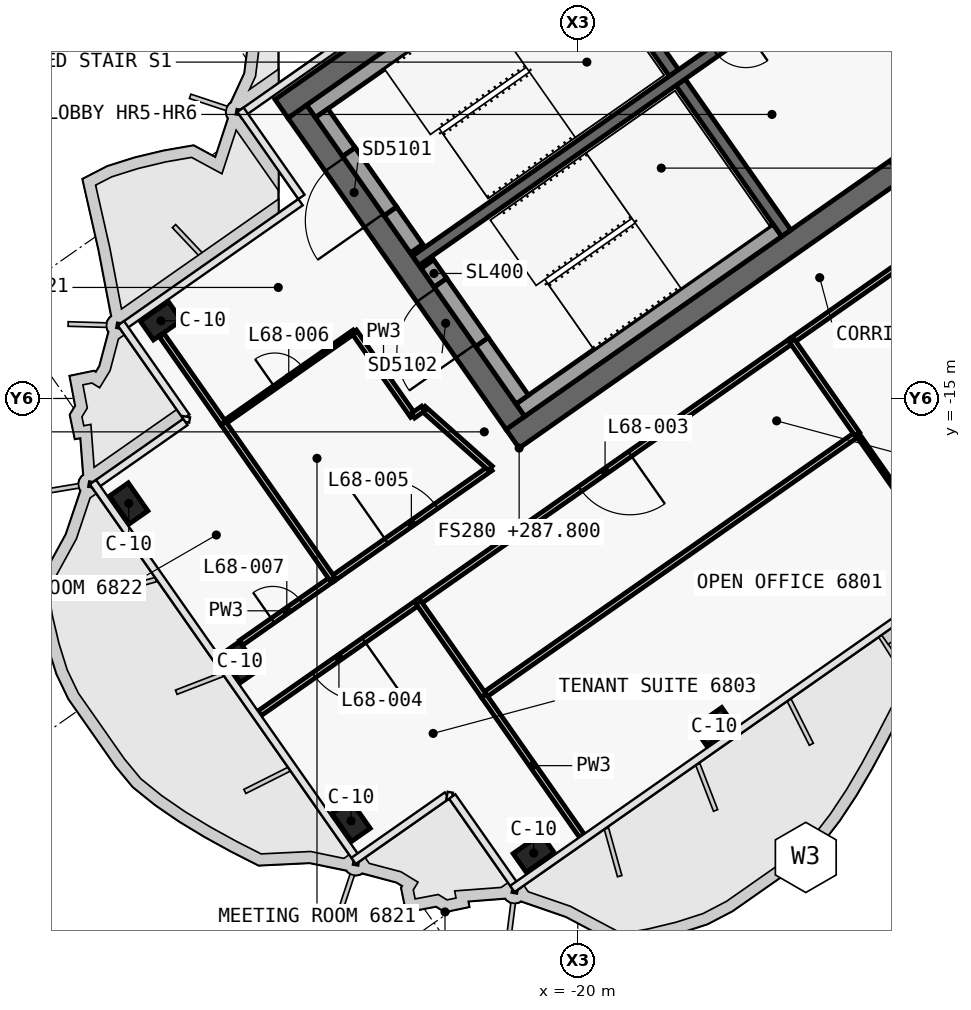
"""IFC4 building model, lengths in metres.
Left out: names, types, materials, properties, quantities, classifications, styles, units other than length and angle.
Written with IfcOpenShell. Run it as: python <this file> out.ifc"""

import sys

from ifc_helpers import new_model, si_unit, direction, frame, frame_2d, origin, origin_2d, place, context, subcontext, project, spatial, polyline, rectangle, outline, extrude, element, fill, save


model = new_model("IFC4")
c1 = context("Model", 3, precision=1e-05, world=origin(), true_north=direction((0.0, 1.0)))
c2 = subcontext(c1, "Body", "Model", "MODEL_VIEW")
j1 = project(units=[si_unit("LENGTHUNIT", "METRE"), si_unit("PLANEANGLEUNIT", "RADIAN")], contexts=[c1])
p1 = place(None, origin())
s1 = spatial("IfcSite", under=j1, at=p1, CompositionType="ELEMENT")
p2 = place(p1, origin())
s2 = spatial("IfcBuilding", under=s1, at=p2, CompositionType="ELEMENT")
p3 = place(p2, frame((0.0, 0.0, 287.8)))
s3 = spatial("IfcBuildingStorey", under=s2, at=p3, CompositionType="ELEMENT", Elevation=287.8)
p4 = place(p3, frame((-0.028, 12.066, 0.0), z_axis=(0.0, 0.0, 1.0), x_axis=(-0.819151382952, -0.573577380837, 0.0)))
e1 = element("IfcWall", 1, at=p4, inside=s3, PredefinedType="SHEAR", context=c2, shape_type="SweptSolid", body=[
    extrude(outline(polyline([(33.898, 0.3), (0.42, 0.3), (0.0, -0.3), (33.898, -0.3), (33.898, 0.3)])), origin(), (0.0, 0.0, 1.0), 3.9),
])
p5 = place(p3, frame((-0.028, -0.874, 0.0), z_axis=(0.0, 0.0, 1.0), x_axis=(-0.819150035022, -0.573579305871, 0.0)))
e2 = element("IfcWall", 2, at=p5, inside=s3, PredefinedType="SHEAR", context=c2, shape_type="SweptSolid", body=[
    extrude(outline(polyline([(26.476, 0.3), (0.42, 0.3), (0.0, -0.3), (26.476, -0.3), (26.476, 0.3)])), origin(), (0.0, 0.0, 1.0), 3.9),
])
p6 = place(p5, frame((2.976, 0.0, 0.0)))
e3 = element("IfcOpeningElement", 3, at=p6, cuts=e2, PredefinedType="OPENING", context=c2, shape_type="SweptSolid", body=[
    extrude(rectangle(XDim=2.4, YDim=2.1, at=frame_2d((1.2, 1.05))), frame((0.0, 0.31, 0.0), z_axis=(0.0, -1.0, 0.0), x_axis=(1.0, 0.0, 0.0)), (0.0, 0.0, 1.0), 0.62),
])
p7 = place(p5, frame((11.776, 0.0, 0.0)))
e4 = element("IfcOpeningElement", 4, at=p7, cuts=e2, PredefinedType="OPENING", context=c2, shape_type="SweptSolid", body=[
    extrude(rectangle(XDim=2.4, YDim=2.1, at=frame_2d((1.2, 1.05))), frame((0.0, 0.31, 0.0), z_axis=(0.0, -1.0, 0.0), x_axis=(1.0, 0.0, 0.0)), (0.0, 0.0, 1.0), 0.62),
])
p8 = place(p3, frame((-21.642, -15.642, 0.0), z_axis=(0.0, 0.0, 1.0), x_axis=(-0.573586866468, 0.819144740944, 0.0)))
e5 = element("IfcWall", 5, at=p8, inside=s3, PredefinedType="SHEAR", context=c2, shape_type="SweptSolid", body=[
    extrude(outline(polyline([(0.0, 0.3), (0.0, -0.3), (10.0, -0.3), (10.0, 0.3), (0.0, 0.3)])), origin(), (0.0, 0.0, 1.0), 3.9),
])
p9 = place(p8, frame((6.5, 0.0, 0.0)))
e6 = element("IfcOpeningElement", 6, at=p9, cuts=e5, PredefinedType="OPENING", context=c2, shape_type="SweptSolid", body=[
    extrude(rectangle(XDim=1.8, YDim=2.1, at=frame_2d((0.9, 1.05))), frame((0.0, 0.31, 0.0), z_axis=(0.0, -1.0, 0.0), x_axis=(1.0, 0.0, 0.0)), (0.0, 0.0, 1.0), 0.62),
])
p10 = place(p8, frame((2.3, 0.0, 0.0)))
e7 = element("IfcOpeningElement", 7, at=p10, cuts=e5, PredefinedType="OPENING", context=c2, shape_type="SweptSolid", body=[
    extrude(rectangle(XDim=1.8, YDim=2.1, at=frame_2d((0.9, 1.05))), frame((0.0, 0.31, 0.0), z_axis=(0.0, -1.0, 0.0), x_axis=(1.0, 0.0, 0.0)), (0.0, 0.0, 1.0), 0.62),
])
p11 = place(p3, frame((-14.515, -10.652, 0.0), z_axis=(0.0, 0.0, 1.0), x_axis=(-0.573560315113, 0.819163332265, 0.0)))
e8 = element("IfcWall", 8, at=p11, inside=s3, PredefinedType="SHEAR", context=c2, shape_type="SweptSolid", body=[
    extrude(outline(polyline([(4.85, 0.15), (0.0, 0.15), (0.0, -0.15), (4.85, -0.15), (4.85, 0.15)])), origin(), (0.0, 0.0, 1.0), 3.9),
])
p12 = place(p3, frame((-17.469, -6.433, 0.0), z_axis=(0.0, 0.0, 1.0), x_axis=(-0.573594092424, 0.81913968109, 0.0)))
e9 = element("IfcWall", 9, at=p12, inside=s3, PredefinedType="SHEAR", context=c2, shape_type="SweptSolid", body=[
    extrude(outline(polyline([(4.85, -0.15), (4.85, 0.15), (0.0, 0.15), (0.0, -0.15), (4.85, -0.15)])), origin(), (0.0, 0.0, 1.0), 3.9),
])
p13 = place(p3, frame((-2.638, 3.768, 0.0), z_axis=(0.0, 0.0, 1.0), x_axis=(-0.819155014212, -0.573572194837, 0.0)))
e10 = element("IfcWall", 10, at=p13, inside=s3, PredefinedType="SHEAR", context=c2, shape_type="SweptSolid", body=[
    extrude(outline(polyline([(26.4, 0.15), (0.0, 0.15), (0.0, -0.15), (26.4, -0.15), (26.4, 0.15)])), origin(), (0.0, 0.0, 1.0), 3.9),
])
p14 = place(p13, frame((1.169, 0.0, 0.0)))
e11 = element("IfcOpeningElement", 11, at=p14, cuts=e10, PredefinedType="OPENING", context=c2, shape_type="SweptSolid", body=[
    extrude(rectangle(XDim=1.1, YDim=2.1, at=frame_2d((0.55, 1.05))), frame((0.0, 0.16, 0.0), z_axis=(0.0, -1.0, 0.0), x_axis=(1.0, 0.0, 0.0)), (0.0, 0.0, 1.0), 0.32),
])
p15 = place(p13, frame((3.206, 0.0, 0.0)))
e12 = element("IfcOpeningElement", 12, at=p15, cuts=e10, PredefinedType="OPENING", context=c2, shape_type="SweptSolid", body=[
    extrude(rectangle(XDim=1.1, YDim=2.1, at=frame_2d((0.55, 1.05))), frame((0.0, 0.16, 0.0), z_axis=(0.0, -1.0, 0.0), x_axis=(1.0, 0.0, 0.0)), (0.0, 0.0, 1.0), 0.32),
])
p16 = place(p13, frame((5.244, 0.0, 0.0)))
e13 = element("IfcOpeningElement", 13, at=p16, cuts=e10, PredefinedType="OPENING", context=c2, shape_type="SweptSolid", body=[
    extrude(rectangle(XDim=1.1, YDim=2.1, at=frame_2d((0.55, 1.05))), frame((0.0, 0.16, 0.0), z_axis=(0.0, -1.0, 0.0), x_axis=(1.0, 0.0, 0.0)), (0.0, 0.0, 1.0), 0.32),
])
p17 = place(p13, frame((7.281, 0.0, 0.0)))
e14 = element("IfcOpeningElement", 14, at=p17, cuts=e10, PredefinedType="OPENING", context=c2, shape_type="SweptSolid", body=[
    extrude(rectangle(XDim=1.1, YDim=2.1, at=frame_2d((0.55, 1.05))), frame((0.0, 0.16, 0.0), z_axis=(0.0, -1.0, 0.0), x_axis=(1.0, 0.0, 0.0)), (0.0, 0.0, 1.0), 0.32),
])
p18 = place(p13, frame((9.688, 0.0, 0.0)))
e15 = element("IfcOpeningElement", 15, at=p18, cuts=e10, PredefinedType="OPENING", context=c2, shape_type="SweptSolid", body=[
    extrude(rectangle(XDim=1.1, YDim=2.1, at=frame_2d((0.55, 1.05))), frame((0.0, 0.16, 0.0), z_axis=(0.0, -1.0, 0.0), x_axis=(1.0, 0.0, 0.0)), (0.0, 0.0, 1.0), 0.32),
])
p19 = place(p13, frame((11.863, 0.0, 0.0)))
e16 = element("IfcOpeningElement", 16, at=p19, cuts=e10, PredefinedType="OPENING", context=c2, shape_type="SweptSolid", body=[
    extrude(rectangle(XDim=1.1, YDim=2.1, at=frame_2d((0.55, 1.05))), frame((0.0, 0.16, 0.0), z_axis=(0.0, -1.0, 0.0), x_axis=(1.0, 0.0, 0.0)), (0.0, 0.0, 1.0), 0.32),
])
p20 = place(p13, frame((13.722, 0.0, 0.0)))
e17 = element("IfcOpeningElement", 17, at=p20, cuts=e10, PredefinedType="OPENING", context=c2, shape_type="SweptSolid", body=[
    extrude(rectangle(XDim=1.0, YDim=2.1, at=frame_2d((0.5, 1.05))), frame((0.0, 0.16, 0.0), z_axis=(0.0, -1.0, 0.0), x_axis=(1.0, 0.0, 0.0)), (0.0, 0.0, 1.0), 0.32),
])
p21 = place(p13, frame((15.798, 0.0, 0.0)))
e18 = element("IfcOpeningElement", 18, at=p21, cuts=e10, PredefinedType="OPENING", context=c2, shape_type="SweptSolid", body=[
    extrude(rectangle(XDim=1.0, YDim=2.1, at=frame_2d((0.5, 1.05))), frame((0.0, 0.16, 0.0), z_axis=(0.0, -1.0, 0.0), x_axis=(1.0, 0.0, 0.0)), (0.0, 0.0, 1.0), 0.32),
])
for number, where, z_axis, x_axis in (
    (19, (-16.41, -23.637, 0.0), (0.0, 0.0, 1.0), (-0.819, -0.574, 0.0)),
    (20, (-21.161, -26.964, 0.0), (0.0, 0.0, 1.0), (-0.819, -0.574, 0.0)),
    (21, (-30.969, -12.956, 0.0), (0.0, 0.0, 1.0), (-0.819, -0.574, 0.0)),
    (22, (-25.966, -26.117, 0.0), (0.0, 0.0, 1.0), (-0.574, 0.819, 0.0)),
    (23, (-28.891, -21.939, 0.0), (0.0, 0.0, 1.0), (-0.574, 0.819, 0.0)),
    (24, (-31.816, -17.761, 0.0), (0.0, 0.0, 1.0), (-0.574, 0.819, 0.0)),
):
    element("IfcColumn", number, at=place(p3, frame(where, z_axis=z_axis, x_axis=x_axis)), inside=s3, PredefinedType="COLUMN", context=c2, shape_type="SweptSolid", body=[
        extrude(rectangle(XDim=0.9, YDim=0.6, at=origin_2d()), origin(), (0.0, 0.0, 1.0), 3.9),
    ])
p22 = place(p3, frame((-20.259, -2.71, 0.0), z_axis=(0.0, 0.0, 1.0), x_axis=(-0.81914849389, -0.573581506813, 0.0)))
e25 = element("IfcWall", 25, at=p22, inside=s3, PredefinedType="SOLIDWALL", context=c2, shape_type="SweptSolid", body=[
    extrude(rectangle(XDim=8.25, YDim=0.4, at=frame_2d((4.125, 0.0))), origin(), (0.0, 0.0, 1.0), 3.62),
])
p23 = place(p3, frame((-24.244, -11.055, 0.0), z_axis=(0.0, 0.0, 1.0), x_axis=(-0.573571582932, 0.819155442668, 0.0)))
e26 = element("IfcWall", 26, at=p23, inside=s3, PredefinedType="SOLIDWALL", context=c2, shape_type="SweptSolid", body=[
    extrude(rectangle(XDim=1.2, YDim=0.4, at=frame_2d((0.6, 0.0))), origin(), (0.0, 0.0, 1.0), 3.62),
])
p24 = place(p3, frame((-26.022, -8.515, 0.0), z_axis=(0.0, 0.0, 1.0), x_axis=(-0.573619628835, 0.819121798889, 0.0)))
e27 = element("IfcWall", 27, at=p24, inside=s3, PredefinedType="SOLIDWALL", context=c2, shape_type="SweptSolid", body=[
    extrude(rectangle(XDim=1.25, YDim=0.4, at=frame_2d((0.625, 0.0))), origin(), (0.0, 0.0, 1.0), 3.62),
])
p25 = place(p3, frame((-24.932, -10.072, 2.15), z_axis=(0.0, 0.0, 1.0), x_axis=(-0.573591692345, 0.819141361715, 0.0)))
e28 = element("IfcWall", 28, at=p25, inside=s3, PredefinedType="SOLIDWALL", context=c2, shape_type="SweptSolid", body=[
    extrude(rectangle(XDim=1.9, YDim=0.4, at=frame_2d((0.95, 0.0))), origin(), (0.0, 0.0, 1.0), 1.47),
])
p26 = place(p3, frame((-14.753, -10.574, 0.0), z_axis=(0.0, 0.0, 1.0), x_axis=(-0.819158229677, -0.573567602601, 0.0)))
e29 = element("IfcWall", 29, at=p26, inside=s3, PredefinedType="SOLIDWALL", context=c2, shape_type="SweptSolid", body=[
    extrude(rectangle(XDim=8.25, YDim=0.4, at=frame_2d((4.125, 0.0))), origin(), (0.0, 0.0, 1.0), 3.62),
])
p27 = place(p3, frame((-21.462, -15.028, 0.0), z_axis=(0.0, 0.0, 1.0), x_axis=(-0.573559770908, 0.819163713305, 0.0)))
e30 = element("IfcWall", 30, at=p27, inside=s3, PredefinedType="SOLIDWALL", context=c2, shape_type="SweptSolid", body=[
    extrude(rectangle(XDim=1.85, YDim=0.4, at=frame_2d((0.925, 0.0))), origin(), (0.0, 0.0, 1.0), 3.62),
])
p28 = place(p3, frame((-23.613, -11.956, 0.0), z_axis=(0.0, 0.0, 1.0), x_axis=(-0.573435029941, 0.819251039936, 0.0)))
e31 = element("IfcWall", 31, at=p28, inside=s3, PredefinedType="SOLIDWALL", context=c2, shape_type="SweptSolid", body=[
    extrude(rectangle(XDim=0.6, YDim=0.4, at=frame_2d((0.3, 0.0))), origin(), (0.0, 0.0, 1.0), 3.62),
])
p29 = place(p3, frame((-22.523, -13.512, 2.15), z_axis=(0.0, 0.0, 1.0), x_axis=(-0.573591692345, 0.819141361715, 0.0)))
e32 = element("IfcWall", 32, at=p29, inside=s3, PredefinedType="SOLIDWALL", context=c2, shape_type="SweptSolid", body=[
    extrude(rectangle(XDim=1.9, YDim=0.4, at=frame_2d((0.95, 0.0))), origin(), (0.0, 0.0, 1.0), 1.47),
])
p30 = place(p3, frame((-26.459, -19.749, 0.0), z_axis=(0.0, 0.0, 1.0), x_axis=(0.819141574295, 0.573591388761, 0.0)))
e33 = element("IfcWall", 33, at=p30, inside=s3, PredefinedType="PARTITIONING", context=c2, shape_type="SweptSolid", body=[
    extrude(rectangle(XDim=5.079, YDim=0.15, at=frame_2d((2.539, 0.0))), origin(), (0.0, 0.0, 1.0), 3.05),
])
p31 = place(p30, frame((1.74, 0.0, 0.0)))
e34 = element("IfcOpeningElement", 34, at=p31, cuts=e33, PredefinedType="OPENING", context=c2, shape_type="SweptSolid", body=[
    extrude(rectangle(XDim=1.6, YDim=2.1, at=frame_2d((0.8, 1.05))), frame((0.0, 0.085, 0.0), z_axis=(0.0, -1.0, 0.0), x_axis=(1.0, 0.0, 0.0)), (0.0, 0.0, 1.0), 0.17),
])
p32 = place(p3, frame((-28.858, -21.428, 0.0), z_axis=(0.0, 0.0, 1.0), x_axis=(0.819149757547, 0.573579702143, 0.0)))
e35 = element("IfcWall", 35, at=p32, inside=s3, PredefinedType="PARTITIONING", context=c2, shape_type="SweptSolid", body=[
    extrude(rectangle(XDim=2.932, YDim=0.15, at=frame_2d((1.466, 0.0))), origin(), (0.0, 0.0, 1.0), 3.05),
])
p33 = place(p32, frame((1.016, 0.0, 0.0)))
e36 = element("IfcOpeningElement", 36, at=p33, cuts=e35, PredefinedType="OPENING", context=c2, shape_type="SweptSolid", body=[
    extrude(rectangle(XDim=0.9, YDim=2.1, at=frame_2d((0.45, 1.05))), frame((0.0, 0.085, 0.0), z_axis=(0.0, -1.0, 0.0), x_axis=(1.0, 0.0, 0.0)), (0.0, 0.0, 1.0), 0.17),
])
p34 = place(p3, frame((-5.766, -7.456, 0.0), z_axis=(0.0, 0.0, 1.0), x_axis=(-0.819154371039, -0.573573113393, 0.0)))
e37 = element("IfcWall", 37, at=p34, inside=s3, PredefinedType="PARTITIONING", context=c2, shape_type="SweptSolid", body=[
    extrude(rectangle(XDim=10.502, YDim=0.15, at=frame_2d((5.251, 0.0))), origin(), (0.0, 0.0, 1.0), 3.05),
])
p35 = place(p34, frame((4.451, 0.0, 0.0)))
e38 = element("IfcOpeningElement", 38, at=p35, cuts=e37, PredefinedType="OPENING", context=c2, shape_type="SweptSolid", body=[
    extrude(rectangle(XDim=1.6, YDim=2.1, at=frame_2d((0.8, 1.05))), frame((0.0, 0.085, 0.0), z_axis=(0.0, -1.0, 0.0), x_axis=(1.0, 0.0, 0.0)), (0.0, 0.0, 1.0), 0.17),
])
p36 = place(p3, frame((-14.366, -13.477, 0.0), z_axis=(0.0, 0.0, 1.0), x_axis=(-0.819164075089, -0.573559254204, 0.0)))
e39 = element("IfcWall", 39, at=p36, inside=s3, PredefinedType="PARTITIONING", context=c2, shape_type="SweptSolid", body=[
    extrude(rectangle(XDim=12.004, YDim=0.15, at=frame_2d((6.002, 0.0))), origin(), (0.0, 0.0, 1.0), 3.05),
])
p37 = place(p36, frame((5.202, 0.0, 0.0)))
e40 = element("IfcOpeningElement", 40, at=p37, cuts=e39, PredefinedType="OPENING", context=c2, shape_type="SweptSolid", body=[
    extrude(rectangle(XDim=1.6, YDim=2.1, at=frame_2d((0.8, 1.05))), frame((0.0, 0.085, 0.0), z_axis=(0.0, -1.0, 0.0), x_axis=(1.0, 0.0, 0.0)), (0.0, 0.0, 1.0), 0.17),
])
p38 = place(p3, frame((-24.196, -20.36, 0.0), z_axis=(0.0, 0.0, 1.0), x_axis=(-0.819132992492, -0.573603644176, 0.0)))
e41 = element("IfcWall", 41, at=p38, inside=s3, PredefinedType="PARTITIONING", context=c2, shape_type="SweptSolid", body=[
    extrude(rectangle(XDim=5.102, YDim=0.15, at=frame_2d((2.551, 0.0))), origin(), (0.0, 0.0, 1.0), 3.0),
])
p39 = place(p38, frame((1.751, 0.0, 0.0)))
e42 = element("IfcOpeningElement", 42, at=p39, cuts=e41, PredefinedType="OPENING", context=c2, shape_type="SweptSolid", body=[
    extrude(rectangle(XDim=1.6, YDim=2.1, at=frame_2d((0.8, 1.05))), frame((0.0, 0.085, 0.0), z_axis=(0.0, -1.0, 0.0), x_axis=(1.0, 0.0, 0.0)), (0.0, 0.0, 1.0), 0.17),
])
p40 = place(p3, frame((-24.337, -15.454, 0.0), z_axis=(0.0, 0.0, 1.0), x_axis=(-0.573571492575, 0.819155505936, 0.0)))
e43 = element("IfcWall", 43, at=p40, inside=s3, PredefinedType="PARTITIONING", context=c2, shape_type="SweptSolid", body=[
    extrude(rectangle(XDim=2.702, YDim=0.15, at=frame_2d((1.351, 0.0))), origin(), (0.0, 0.0, 1.0), 3.62),
])
p41 = place(p3, frame((-22.3, -16.837, 0.0), z_axis=(0.0, 0.0, 1.0), x_axis=(-0.746942190663, 0.664888986078, 0.0)))
e44 = element("IfcWall", 44, at=p41, inside=s3, PredefinedType="PARTITIONING", context=c2, shape_type="SweptSolid", body=[
    extrude(rectangle(XDim=2.365, YDim=0.15, at=frame_2d((1.183, 0.0))), origin(), (0.0, 0.0, 1.0), 3.62),
])
p42 = place(p3, frame((-24.067, -15.265, 0.0), z_axis=(0.0, 0.0, 1.0), x_axis=(-0.819092976344, -0.573660784876, 0.0)))
e45 = element("IfcWall", 45, at=p42, inside=s3, PredefinedType="PARTITIONING", context=c2, shape_type="SweptSolid", body=[
    extrude(rectangle(XDim=0.33, YDim=0.15, at=frame_2d((0.165, 0.0))), origin(), (0.0, 0.0, 1.0), 3.62),
])
p43 = place(p3, frame((-29.327, -15.651, 0.0), z_axis=(0.0, 0.0, 1.0), x_axis=(0.819139100631, 0.573594921367, 0.0)))
e46 = element("IfcWall", 46, at=p43, inside=s3, PredefinedType="PARTITIONING", context=c2, shape_type="SweptSolid", body=[
    extrude(rectangle(XDim=4.202, YDim=0.1, at=frame_2d((2.101, 0.0))), origin(), (0.0, 0.0, 1.0), 3.05),
])
p44 = place(p43, frame((1.651, 0.0, 0.0)))
e47 = element("IfcOpeningElement", 47, at=p44, cuts=e46, PredefinedType="OPENING", context=c2, shape_type="SweptSolid", body=[
    extrude(rectangle(XDim=0.9, YDim=2.1, at=frame_2d((0.45, 1.05))), frame((0.0, 0.06, 0.0), z_axis=(0.0, -1.0, 0.0), x_axis=(1.0, 0.0, 0.0)), (0.0, 0.0, 1.0), 0.12),
])
p45 = place(p3, frame((-29.327, -15.651, 0.0), z_axis=(0.0, 0.0, 1.0), x_axis=(-0.573555012677, 0.819167044889, 0.0)))
e48 = element("IfcWall", 48, at=p45, inside=s3, PredefinedType="PARTITIONING", context=c2, shape_type="SweptSolid", body=[
    extrude(rectangle(XDim=2.829, YDim=0.15, at=frame_2d((1.415, 0.0))), origin(), (0.0, 0.0, 1.0), 3.0),
])
p46 = place(p3, frame((-26.458, -19.747, 0.0), z_axis=(0.0, 0.0, 1.0), x_axis=(-0.573563925118, 0.819160804606, 0.0)))
e49 = element("IfcWall", 49, at=p46, inside=s3, PredefinedType="PARTITIONING", context=c2, shape_type="SweptSolid", body=[
    extrude(rectangle(XDim=5.0, YDim=0.15, at=frame_2d((2.5, 0.0))), origin(), (0.0, 0.0, 1.0), 3.05),
])
p47 = place(p3, frame((-11.499, -17.575, 0.0), z_axis=(0.0, 0.0, 1.0), x_axis=(-0.573486922046, 0.819214715592, 0.0)))
e50 = element("IfcWall", 50, at=p47, inside=s3, PredefinedType="PARTITIONING", context=c2, shape_type="SweptSolid", body=[
    extrude(rectangle(XDim=2.0, YDim=0.1, at=frame_2d((1.0, 0.0))), origin(), (0.0, 0.0, 1.0), 3.62),
])
p48 = place(p3, frame((-22.476, -22.82, 0.0), z_axis=(0.0, 0.0, 1.0), x_axis=(0.819153538506, 0.573574302382, 0.0)))
e51 = element("IfcWall", 51, at=p48, inside=s3, PredefinedType="PARTITIONING", context=c2, shape_type="SweptSolid", body=[
    extrude(rectangle(XDim=12.0, YDim=0.15, at=frame_2d((6.0, 0.0))), origin(), (0.0, 0.0, 1.0), 3.05),
])
p49 = place(p3, frame((-19.896, -26.505, 0.0), z_axis=(0.0, 0.0, 1.0), x_axis=(-0.573589807488, 0.819142681555, 0.0)))
e52 = element("IfcWall", 52, at=p49, inside=s3, PredefinedType="PARTITIONING", context=c2, shape_type="SweptSolid", body=[
    extrude(rectangle(XDim=4.499, YDim=0.15, at=frame_2d((2.25, 0.0))), origin(), (0.0, 0.0, 1.0), 3.0),
])
p50 = place(p3, frame((-12.646, -15.938, 0.0), z_axis=(0.0, 0.0, 1.0), x_axis=(-0.573604249862, 0.819132568355, 0.0)))
e53 = element("IfcWall", 53, at=p50, inside=s3, PredefinedType="PARTITIONING", context=c2, shape_type="SweptSolid", body=[
    extrude(rectangle(XDim=3.002, YDim=0.15, at=frame_2d((1.501, 0.0))), origin(), (0.0, 0.0, 1.0), 3.62),
])
p51 = place(p3, frame((-22.477, -22.819, 0.0), z_axis=(0.0, 0.0, 1.0), x_axis=(-0.573598887793, 0.819136323161, 0.0)))
e54 = element("IfcWall", 54, at=p51, inside=s3, PredefinedType="PARTITIONING", context=c2, shape_type="SweptSolid", body=[
    extrude(rectangle(XDim=3.0, YDim=0.15, at=frame_2d((1.5, 0.0))), origin(), (0.0, 0.0, 1.0), 3.62),
])
p52 = place(p21, origin())
e55 = element("IfcDoor", 55, at=p52, inside=s3, OperationType="SINGLE_SWING_RIGHT", PredefinedType="DOOR", context=c2, shape_type="SweptSolid", body=[
    extrude(rectangle(XDim=1.0, YDim=2.1, at=frame_2d((0.5, 1.05))), frame((0.0, 0.025, 0.0), z_axis=(0.0, -1.0, 0.0), x_axis=(1.0, 0.0, 0.0)), (0.0, 0.0, 1.0), 0.05),
])
fill(e18, e55)
p53 = place(p9, origin())
e56 = element("IfcDoor", 56, at=p53, inside=s3, OperationType="DOUBLE_DOOR_SINGLE_SWING", PredefinedType="DOOR", context=c2, shape_type="SweptSolid", body=[
    extrude(rectangle(XDim=1.8, YDim=2.1, at=frame_2d((0.9, 1.05))), frame((0.0, 0.025, 0.0), z_axis=(0.0, -1.0, 0.0), x_axis=(1.0, 0.0, 0.0)), (0.0, 0.0, 1.0), 0.05),
])
fill(e6, e56)
p54 = place(p10, origin())
e57 = element("IfcDoor", 57, at=p54, inside=s3, OperationType="DOUBLE_DOOR_SINGLE_SWING", PredefinedType="DOOR", context=c2, shape_type="SweptSolid", body=[
    extrude(rectangle(XDim=1.8, YDim=2.1, at=frame_2d((0.9, 1.05))), frame((0.0, 0.025, 0.0), z_axis=(0.0, -1.0, 0.0), x_axis=(1.0, 0.0, 0.0)), (0.0, 0.0, 1.0), 0.05),
])
fill(e7, e57)
p55 = place(p37, origin())
e58 = element("IfcDoor", 58, at=p55, inside=s3, OperationType="DOUBLE_DOOR_SINGLE_SWING", PredefinedType="DOOR", context=c2, shape_type="SweptSolid", body=[
    extrude(rectangle(XDim=1.6, YDim=2.1, at=frame_2d((0.8, 1.05))), frame((0.0, 0.025, 0.0), z_axis=(0.0, -1.0, 0.0), x_axis=(1.0, 0.0, 0.0)), (0.0, 0.0, 1.0), 0.05),
])
fill(e40, e58)
p56 = place(p39, origin())
e59 = element("IfcDoor", 59, at=p56, inside=s3, OperationType="DOUBLE_DOOR_SINGLE_SWING", PredefinedType="DOOR", context=c2, shape_type="SweptSolid", body=[
    extrude(rectangle(XDim=1.6, YDim=2.1, at=frame_2d((0.8, 1.05))), frame((0.0, 0.025, 0.0), z_axis=(0.0, -1.0, 0.0), x_axis=(1.0, 0.0, 0.0)), (0.0, 0.0, 1.0), 0.05),
])
fill(e42, e59)
p57 = place(p31, origin())
e60 = element("IfcDoor", 60, at=p57, inside=s3, OperationType="DOUBLE_DOOR_SINGLE_SWING", PredefinedType="DOOR", context=c2, shape_type="SweptSolid", body=[
    extrude(rectangle(XDim=1.6, YDim=2.1, at=frame_2d((0.8, 1.05))), frame((0.0, 0.025, 0.0), z_axis=(0.0, -1.0, 0.0), x_axis=(1.0, 0.0, 0.0)), (0.0, 0.0, 1.0), 0.05),
])
fill(e34, e60)
p58 = place(p44, origin())
e61 = element("IfcDoor", 61, at=p58, inside=s3, OperationType="SINGLE_SWING_LEFT", PredefinedType="DOOR", context=c2, shape_type="SweptSolid", body=[
    extrude(rectangle(XDim=0.9, YDim=2.1, at=frame_2d((0.45, 1.05))), frame((0.0, 0.025, 0.0), z_axis=(0.0, -1.0, 0.0), x_axis=(1.0, 0.0, 0.0)), (0.0, 0.0, 1.0), 0.05),
])
fill(e47, e61)
p59 = place(p33, origin())
e62 = element("IfcDoor", 62, at=p59, inside=s3, OperationType="SINGLE_SWING_RIGHT", PredefinedType="DOOR", context=c2, shape_type="SweptSolid", body=[
    extrude(rectangle(XDim=0.9, YDim=2.1, at=frame_2d((0.45, 1.05))), frame((0.0, 0.025, 0.0), z_axis=(0.0, -1.0, 0.0), x_axis=(1.0, 0.0, 0.0)), (0.0, 0.0, 1.0), 0.05),
])
fill(e36, e62)
save(model, sys.argv[1])
